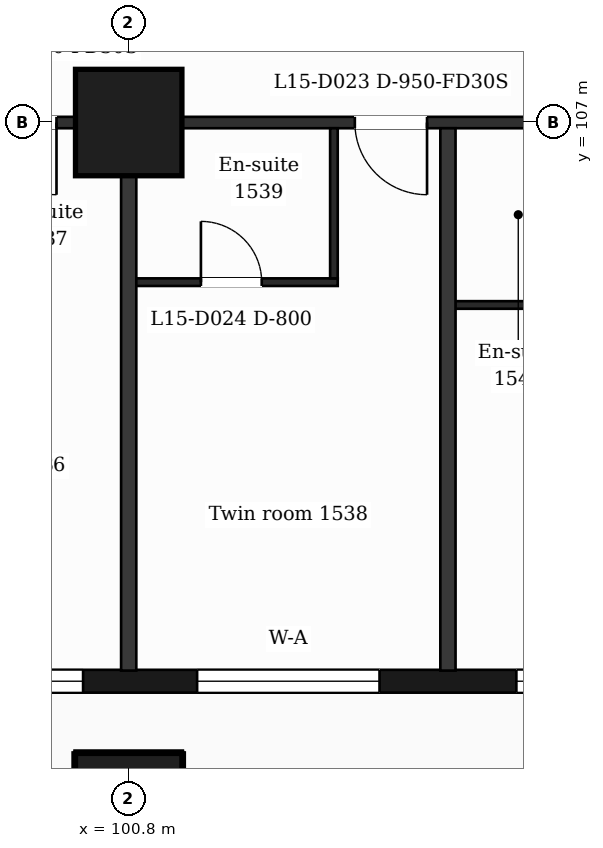
"""IFC4 building model, lengths in metres.
Left out: names, types, materials, properties, quantities, classifications, styles, units other than length and angle.
Written with IfcOpenShell. Run it as: python <this file> out.ifc"""

import sys

from ifc_helpers import new_model, si_unit, direction, frame, frame_2d, origin, origin_2d, place, context, subcontext, project, spatial, rectangle, extrude, element, fill, save


model = new_model("IFC4")
c1 = context("Model", 3, precision=1e-05, world=origin(), true_north=direction((0.0, 1.0)))
c2 = subcontext(c1, "Body", "Model", "MODEL_VIEW")
j1 = project(units=[si_unit("LENGTHUNIT", "METRE"), si_unit("PLANEANGLEUNIT", "RADIAN")], contexts=[c1])
p1 = place(None, origin())
s1 = spatial("IfcSite", under=j1, at=p1, CompositionType="ELEMENT")
p2 = place(p1, origin())
s2 = spatial("IfcBuilding", under=s1, at=p2, CompositionType="ELEMENT")
p3 = place(p2, frame((0.0, 0.0, 70.5)))
s3 = spatial("IfcBuildingStorey", under=s2, at=p3, CompositionType="ELEMENT", Elevation=70.5)
for number, where, z_axis, x_axis in (
    (1, (100.8, 98.0, 0.0), (0.0, 0.0, 1.0), (1.0, 0.0, 0.0)),
    (2, (100.8, 107.0, 0.0), (0.0, 0.0, 1.0), (1.0, 0.0, 0.0)),
):
    element("IfcColumn", number, at=place(p3, frame(where, z_axis=z_axis, x_axis=x_axis)), inside=s3, PredefinedType="COLUMN", context=c2, shape_type="SweptSolid", body=[
        extrude(rectangle(XDim=1.4, YDim=1.4, at=origin_2d()), origin(), (0.0, 0.0, 1.0), 3.5),
    ])
p4 = place(p3, frame((89.85, 99.65, 0.0), z_axis=(0.0, 0.0, 1.0), x_axis=(1.0, 0.0, 0.0)))
e3 = element("IfcWall", 3, at=p4, inside=s3, PredefinedType="SOLIDWALL", context=c2, shape_type="SweptSolid", body=[
    extrude(rectangle(XDim=47.25, YDim=0.3, at=frame_2d((23.625, 0.0))), origin(), (0.0, 0.0, 1.0), 3.18),
])
p5 = place(p4, frame((0.725, 0.0, 0.9)))
e4 = element("IfcOpeningElement", 4, at=p5, cuts=e3, PredefinedType="OPENING", context=c2, shape_type="SweptSolid", body=[
    extrude(rectangle(XDim=1.2, YDim=2.1, at=frame_2d((0.6, 1.05))), frame((0.0, 0.16, 0.0), z_axis=(0.0, -1.0, 0.0), x_axis=(1.0, 0.0, 0.0)), (0.0, 0.0, 1.0), 0.32),
])
p6 = place(p4, frame((3.45, 0.0, 0.9)))
e5 = element("IfcOpeningElement", 5, at=p6, cuts=e3, PredefinedType="OPENING", context=c2, shape_type="SweptSolid", body=[
    extrude(rectangle(XDim=2.4, YDim=2.1, at=frame_2d((1.2, 1.05))), frame((0.0, 0.16, 0.0), z_axis=(0.0, -1.0, 0.0), x_axis=(1.0, 0.0, 0.0)), (0.0, 0.0, 1.0), 0.32),
])
p7 = place(p4, frame((7.35, 0.0, 0.0)))
e6 = element("IfcOpeningElement", 6, at=p7, cuts=e3, PredefinedType="OPENING", context=c2, shape_type="SweptSolid", body=[
    extrude(rectangle(XDim=1.2, YDim=2.4, at=frame_2d((0.6, 1.2))), frame((0.0, 0.16, 0.0), z_axis=(0.0, -1.0, 0.0), x_axis=(1.0, 0.0, 0.0)), (0.0, 0.0, 1.0), 0.32),
])
p8 = place(p4, frame((9.15, 0.0, 0.9)))
e7 = element("IfcOpeningElement", 7, at=p8, cuts=e3, PredefinedType="OPENING", context=c2, shape_type="SweptSolid", body=[
    extrude(rectangle(XDim=1.2, YDim=2.1, at=frame_2d((0.6, 1.05))), frame((0.0, 0.16, 0.0), z_axis=(0.0, -1.0, 0.0), x_axis=(1.0, 0.0, 0.0)), (0.0, 0.0, 1.0), 0.32),
])
p9 = place(p4, frame((11.85, 0.0, 0.9)))
e8 = element("IfcOpeningElement", 8, at=p9, cuts=e3, PredefinedType="OPENING", context=c2, shape_type="SweptSolid", body=[
    extrude(rectangle(XDim=2.4, YDim=2.1, at=frame_2d((1.2, 1.05))), frame((0.0, 0.16, 0.0), z_axis=(0.0, -1.0, 0.0), x_axis=(1.0, 0.0, 0.0)), (0.0, 0.0, 1.0), 0.32),
])
p10 = place(p4, frame((16.05, 0.0, 0.9)))
e9 = element("IfcOpeningElement", 9, at=p10, cuts=e3, PredefinedType="OPENING", context=c2, shape_type="SweptSolid", body=[
    extrude(rectangle(XDim=2.4, YDim=2.1, at=frame_2d((1.2, 1.05))), frame((0.0, 0.16, 0.0), z_axis=(0.0, -1.0, 0.0), x_axis=(1.0, 0.0, 0.0)), (0.0, 0.0, 1.0), 0.32),
])
p11 = place(p4, frame((20.85, 0.0, 0.9)))
e10 = element("IfcOpeningElement", 10, at=p11, cuts=e3, PredefinedType="OPENING", context=c2, shape_type="SweptSolid", body=[
    extrude(rectangle(XDim=1.2, YDim=2.1, at=frame_2d((0.6, 1.05))), frame((0.0, 0.16, 0.0), z_axis=(0.0, -1.0, 0.0), x_axis=(1.0, 0.0, 0.0)), (0.0, 0.0, 1.0), 0.32),
])
p12 = place(p4, frame((25.05, 0.0, 0.9)))
e11 = element("IfcOpeningElement", 11, at=p12, cuts=e3, PredefinedType="OPENING", context=c2, shape_type="SweptSolid", body=[
    extrude(rectangle(XDim=1.2, YDim=2.1, at=frame_2d((0.6, 1.05))), frame((0.0, 0.16, 0.0), z_axis=(0.0, -1.0, 0.0), x_axis=(1.0, 0.0, 0.0)), (0.0, 0.0, 1.0), 0.32),
])
p13 = place(p4, frame((28.65, 0.0, 0.9)))
e12 = element("IfcOpeningElement", 12, at=p13, cuts=e3, PredefinedType="OPENING", context=c2, shape_type="SweptSolid", body=[
    extrude(rectangle(XDim=2.4, YDim=2.1, at=frame_2d((1.2, 1.05))), frame((0.0, 0.16, 0.0), z_axis=(0.0, -1.0, 0.0), x_axis=(1.0, 0.0, 0.0)), (0.0, 0.0, 1.0), 0.32),
])
p14 = place(p4, frame((32.85, 0.0, 0.9)))
e13 = element("IfcOpeningElement", 13, at=p14, cuts=e3, PredefinedType="OPENING", context=c2, shape_type="SweptSolid", body=[
    extrude(rectangle(XDim=2.4, YDim=2.1, at=frame_2d((1.2, 1.05))), frame((0.0, 0.16, 0.0), z_axis=(0.0, -1.0, 0.0), x_axis=(1.0, 0.0, 0.0)), (0.0, 0.0, 1.0), 0.32),
])
p15 = place(p4, frame((37.05, 0.0, 0.9)))
e14 = element("IfcOpeningElement", 14, at=p15, cuts=e3, PredefinedType="OPENING", context=c2, shape_type="SweptSolid", body=[
    extrude(rectangle(XDim=2.4, YDim=2.1, at=frame_2d((1.2, 1.05))), frame((0.0, 0.16, 0.0), z_axis=(0.0, -1.0, 0.0), x_axis=(1.0, 0.0, 0.0)), (0.0, 0.0, 1.0), 0.32),
])
p16 = place(p4, frame((41.25, 0.0, 0.9)))
e15 = element("IfcOpeningElement", 15, at=p16, cuts=e3, PredefinedType="OPENING", context=c2, shape_type="SweptSolid", body=[
    extrude(rectangle(XDim=2.4, YDim=2.1, at=frame_2d((1.2, 1.05))), frame((0.0, 0.16, 0.0), z_axis=(0.0, -1.0, 0.0), x_axis=(1.0, 0.0, 0.0)), (0.0, 0.0, 1.0), 0.32),
])
p17 = place(p4, frame((45.25, 0.0, 0.9)))
e16 = element("IfcOpeningElement", 16, at=p17, cuts=e3, PredefinedType="OPENING", context=c2, shape_type="SweptSolid", body=[
    extrude(rectangle(XDim=1.2, YDim=2.1, at=frame_2d((0.6, 1.05))), frame((0.0, 0.16, 0.0), z_axis=(0.0, -1.0, 0.0), x_axis=(1.0, 0.0, 0.0)), (0.0, 0.0, 1.0), 0.32),
])
p18 = place(p3, frame((105.0, 104.6, 0.0), z_axis=(0.0, 0.0, 1.0), x_axis=(1.0, 0.0, 0.0)))
e17 = element("IfcWall", 17, at=p18, inside=s3, PredefinedType="PARTITIONING", context=c2, shape_type="SweptSolid", body=[
    extrude(rectangle(XDim=1.85, YDim=0.1, at=frame_2d((0.925, 0.0))), origin(), (0.0, 0.0, 1.0), 3.18),
])
p19 = place(p3, frame((100.8, 104.9, 0.0), z_axis=(0.0, 0.0, 1.0), x_axis=(1.0, 0.0, 0.0)))
e18 = element("IfcWall", 18, at=p19, inside=s3, PredefinedType="PARTITIONING", context=c2, shape_type="SweptSolid", body=[
    extrude(rectangle(XDim=2.75, YDim=0.1, at=frame_2d((1.375, 0.0))), origin(), (0.0, 0.0, 1.0), 3.18),
])
p20 = place(p19, frame((0.95, 0.0, 0.0)))
e19 = element("IfcOpeningElement", 19, at=p20, cuts=e18, PredefinedType="OPENING", context=c2, shape_type="SweptSolid", body=[
    extrude(rectangle(XDim=0.8, YDim=2.1, at=frame_2d((0.4, 1.05))), frame((0.0, 0.06, 0.0), z_axis=(0.0, -1.0, 0.0), x_axis=(1.0, 0.0, 0.0)), (0.0, 0.0, 1.0), 0.12),
])
p21 = place(p3, frame((87.018, 107.0, 0.0), z_axis=(0.0, 0.0, 1.0), x_axis=(1.0, 0.0, 0.0)))
e20 = element("IfcWall", 20, at=p21, inside=s3, PredefinedType="PARTITIONING", context=c2, shape_type="SweptSolid", body=[
    extrude(rectangle(XDim=52.765, YDim=0.15, at=frame_2d((26.382, 0.0))), origin(), (0.0, 0.0, 1.0), 3.18),
])
p22 = place(p21, frame((0.87, 0.0, 0.0)))
e21 = element("IfcOpeningElement", 21, at=p22, cuts=e20, PredefinedType="OPENING", context=c2, shape_type="SweptSolid", body=[
    extrude(rectangle(XDim=0.95, YDim=2.1, at=frame_2d((0.475, 1.05))), frame((0.0, 0.085, 0.0), z_axis=(0.0, -1.0, 0.0), x_axis=(1.0, 0.0, 0.0)), (0.0, 0.0, 1.0), 0.17),
])
p23 = place(p21, frame((6.332, 0.0, 0.0)))
e22 = element("IfcOpeningElement", 22, at=p23, cuts=e20, PredefinedType="OPENING", context=c2, shape_type="SweptSolid", body=[
    extrude(rectangle(XDim=0.95, YDim=2.1, at=frame_2d((0.475, 1.05))), frame((0.0, 0.085, 0.0), z_axis=(0.0, -1.0, 0.0), x_axis=(1.0, 0.0, 0.0)), (0.0, 0.0, 1.0), 0.17),
])
p24 = place(p21, frame((11.882, 0.0, 0.0)))
e23 = element("IfcOpeningElement", 23, at=p24, cuts=e20, PredefinedType="OPENING", context=c2, shape_type="SweptSolid", body=[
    extrude(rectangle(XDim=0.95, YDim=2.1, at=frame_2d((0.475, 1.05))), frame((0.0, 0.085, 0.0), z_axis=(0.0, -1.0, 0.0), x_axis=(1.0, 0.0, 0.0)), (0.0, 0.0, 1.0), 0.17),
])
p25 = place(p21, frame((16.757, 0.0, 0.0)))
e24 = element("IfcOpeningElement", 24, at=p25, cuts=e20, PredefinedType="OPENING", context=c2, shape_type="SweptSolid", body=[
    extrude(rectangle(XDim=0.95, YDim=2.1, at=frame_2d((0.475, 1.05))), frame((0.0, 0.085, 0.0), z_axis=(0.0, -1.0, 0.0), x_axis=(1.0, 0.0, 0.0)), (0.0, 0.0, 1.0), 0.17),
])
p26 = place(p21, frame((20.319, 0.0, 0.0)))
e25 = element("IfcOpeningElement", 25, at=p26, cuts=e20, PredefinedType="OPENING", context=c2, shape_type="SweptSolid", body=[
    extrude(rectangle(XDim=0.95, YDim=2.1, at=frame_2d((0.475, 1.05))), frame((0.0, 0.085, 0.0), z_axis=(0.0, -1.0, 0.0), x_axis=(1.0, 0.0, 0.0)), (0.0, 0.0, 1.0), 0.17),
])
p27 = place(p21, frame((23.132, 0.0, 0.0)))
e26 = element("IfcOpeningElement", 26, at=p27, cuts=e20, PredefinedType="OPENING", context=c2, shape_type="SweptSolid", body=[
    extrude(rectangle(XDim=0.95, YDim=2.1, at=frame_2d((0.475, 1.05))), frame((0.0, 0.085, 0.0), z_axis=(0.0, -1.0, 0.0), x_axis=(1.0, 0.0, 0.0)), (0.0, 0.0, 1.0), 0.17),
])
p28 = place(p21, frame((26.657, 0.0, 0.0)))
e27 = element("IfcOpeningElement", 27, at=p28, cuts=e20, PredefinedType="OPENING", context=c2, shape_type="SweptSolid", body=[
    extrude(rectangle(XDim=0.95, YDim=2.1, at=frame_2d((0.475, 1.05))), frame((0.0, 0.085, 0.0), z_axis=(0.0, -1.0, 0.0), x_axis=(1.0, 0.0, 0.0)), (0.0, 0.0, 1.0), 0.17),
])
p29 = place(p21, frame((34.952, 0.0, 0.0)))
e28 = element("IfcOpeningElement", 28, at=p29, cuts=e20, PredefinedType="OPENING", context=c2, shape_type="SweptSolid", body=[
    extrude(rectangle(XDim=1.0, YDim=2.1, at=frame_2d((0.5, 1.05))), frame((0.0, 0.085, 0.0), z_axis=(0.0, -1.0, 0.0), x_axis=(1.0, 0.0, 0.0)), (0.0, 0.0, 1.0), 0.17),
])
p30 = place(p21, frame((45.062, 0.0, 0.0)))
e29 = element("IfcOpeningElement", 29, at=p30, cuts=e20, PredefinedType="OPENING", context=c2, shape_type="SweptSolid", body=[
    extrude(rectangle(XDim=0.95, YDim=2.1, at=frame_2d((0.475, 1.05))), frame((0.0, 0.085, 0.0), z_axis=(0.0, -1.0, 0.0), x_axis=(1.0, 0.0, 0.0)), (0.0, 0.0, 1.0), 0.17),
])
p31 = place(p21, frame((49.285, 0.0, 0.0)))
e30 = element("IfcOpeningElement", 30, at=p31, cuts=e20, PredefinedType="OPENING", context=c2, shape_type="SweptSolid", body=[
    extrude(rectangle(XDim=0.95, YDim=2.1, at=frame_2d((0.475, 1.05))), frame((0.0, 0.085, 0.0), z_axis=(0.0, -1.0, 0.0), x_axis=(1.0, 0.0, 0.0)), (0.0, 0.0, 1.0), 0.17),
])
p32 = place(p3, frame((100.8, 99.79, 0.0), z_axis=(0.0, 0.0, 1.0), x_axis=(0.0, 1.0, 0.0)))
e31 = element("IfcWall", 31, at=p32, inside=s3, PredefinedType="PARTITIONING", context=c2, shape_type="SweptSolid", body=[
    extrude(rectangle(XDim=7.135, YDim=0.2, at=frame_2d((3.567, 0.0))), origin(), (0.0, 0.0, 1.0), 3.18),
])
p33 = place(p3, frame((103.5, 104.95, 0.0), z_axis=(0.0, 0.0, 1.0), x_axis=(0.0, 1.0, 0.0)))
e32 = element("IfcWall", 32, at=p33, inside=s3, PredefinedType="PARTITIONING", context=c2, shape_type="SweptSolid", body=[
    extrude(rectangle(XDim=1.975, YDim=0.1, at=frame_2d((0.988, 0.0))), origin(), (0.0, 0.0, 1.0), 3.18),
])
p34 = place(p3, frame((105.0, 99.79, 0.0), z_axis=(0.0, 0.0, 1.0), x_axis=(0.0, 1.0, 0.0)))
e33 = element("IfcWall", 33, at=p34, inside=s3, PredefinedType="PARTITIONING", context=c2, shape_type="SweptSolid", body=[
    extrude(rectangle(XDim=7.135, YDim=0.2, at=frame_2d((3.567, 0.0))), origin(), (0.0, 0.0, 1.0), 3.18),
])
p35 = place(p8, origin())
e34 = element("IfcWindow", 34, at=p35, inside=s3, PartitioningType="SINGLE_PANEL", PredefinedType="WINDOW", context=c2, shape_type="SweptSolid", body=[
    extrude(rectangle(XDim=1.2, YDim=2.1, at=frame_2d((0.6, 1.05))), frame((0.0, 0.03, 0.0), z_axis=(0.0, -1.0, 0.0), x_axis=(1.0, 0.0, 0.0)), (0.0, 0.0, 1.0), 0.06),
])
fill(e7, e34)
p36 = place(p9, origin())
e35 = element("IfcWindow", 35, at=p36, inside=s3, PartitioningType="SINGLE_PANEL", PredefinedType="WINDOW", context=c2, shape_type="SweptSolid", body=[
    extrude(rectangle(XDim=2.4, YDim=2.1, at=frame_2d((1.2, 1.05))), frame((0.0, 0.03, 0.0), z_axis=(0.0, -1.0, 0.0), x_axis=(1.0, 0.0, 0.0)), (0.0, 0.0, 1.0), 0.06),
])
fill(e8, e35)
p37 = place(p10, origin())
e36 = element("IfcWindow", 36, at=p37, inside=s3, PartitioningType="SINGLE_PANEL", PredefinedType="WINDOW", context=c2, shape_type="SweptSolid", body=[
    extrude(rectangle(XDim=2.4, YDim=2.1, at=frame_2d((1.2, 1.05))), frame((0.0, 0.03, 0.0), z_axis=(0.0, -1.0, 0.0), x_axis=(1.0, 0.0, 0.0)), (0.0, 0.0, 1.0), 0.06),
])
fill(e9, e36)
p38 = place(p24, origin())
e37 = element("IfcDoor", 37, at=p38, inside=s3, OperationType="SINGLE_SWING_RIGHT", PredefinedType="DOOR", context=c2, shape_type="SweptSolid", body=[
    extrude(rectangle(XDim=0.95, YDim=2.1, at=frame_2d((0.475, 1.05))), frame((0.0, 0.025, 0.0), z_axis=(0.0, -1.0, 0.0), x_axis=(1.0, 0.0, 0.0)), (0.0, 0.0, 1.0), 0.05),
])
fill(e23, e37)
p39 = place(p25, origin())
e38 = element("IfcDoor", 38, at=p39, inside=s3, OperationType="SINGLE_SWING_RIGHT", PredefinedType="DOOR", context=c2, shape_type="SweptSolid", body=[
    extrude(rectangle(XDim=0.95, YDim=2.1, at=frame_2d((0.475, 1.05))), frame((0.0, 0.025, 0.0), z_axis=(0.0, -1.0, 0.0), x_axis=(1.0, 0.0, 0.0)), (0.0, 0.0, 1.0), 0.05),
])
fill(e24, e38)
p40 = place(p20, origin())
e39 = element("IfcDoor", 39, at=p40, inside=s3, OperationType="SINGLE_SWING_LEFT", PredefinedType="DOOR", context=c2, shape_type="SweptSolid", body=[
    extrude(rectangle(XDim=0.8, YDim=2.1, at=frame_2d((0.4, 1.05))), frame((0.0, 0.025, 0.0), z_axis=(0.0, -1.0, 0.0), x_axis=(1.0, 0.0, 0.0)), (0.0, 0.0, 1.0), 0.05),
])
fill(e19, e39)
save(model, sys.argv[1])
